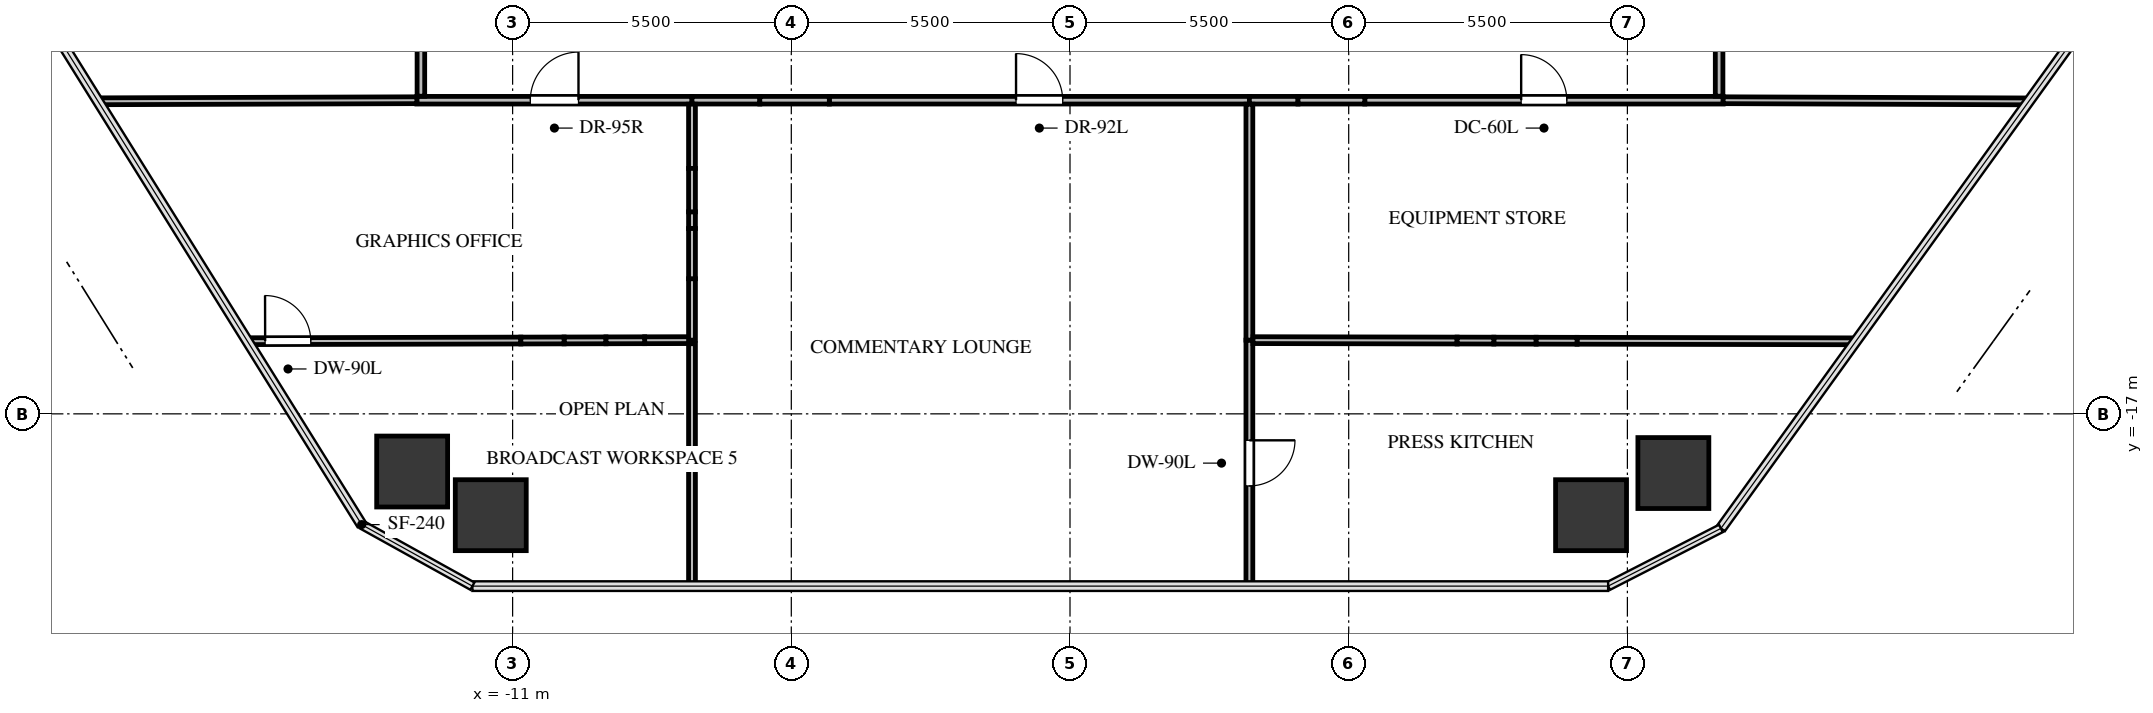
"""IFC4 building model, lengths in metres.
Left out: names, types, materials, properties, quantities, classifications, styles, units other than length and angle.
Written with IfcOpenShell. Run it as: python <this file> out.ifc"""

import sys

from ifc_helpers import new_model, si_unit, direction, frame, frame_2d, origin, origin_2d, place, context, subcontext, project, spatial, rectangle, extrude, source, transform, mapped, element, fill, save


model = new_model("IFC4")
c1 = context("Model", 3, precision=1e-05, world=origin(), true_north=direction((0.0, 1.0)))
c2 = subcontext(c1, "Body", "Model", "MODEL_VIEW")
j1 = project(units=[si_unit("LENGTHUNIT", "METRE"), si_unit("PLANEANGLEUNIT", "RADIAN")], contexts=[c1])
p1 = place(None, origin())
s1 = spatial("IfcSite", under=j1, at=p1, CompositionType="ELEMENT")
p2 = place(p1, origin())
s2 = spatial("IfcBuilding", under=s1, at=p2, CompositionType="ELEMENT")
p3 = place(p2, frame((0.0, 0.0, 48.9)))
s3 = spatial("IfcBuildingStorey", under=s2, at=p3, CompositionType="ELEMENT", Elevation=48.9)
m1 = source(origin(), c2, "Body", "SweptSolid", [
    extrude(rectangle(XDim=1.4, YDim=1.4, at=origin_2d()), origin(), (0.0, 0.0, 1.0), 3.3),
])
for number, where, z_axis, x_axis in (
    (1, (-12.983, -18.138, -0.24), (0.0, 0.0, 1.0), (1.0, 0.0, 0.0)),
    (2, (11.907, -18.168, -0.24), (0.0, 0.0, 1.0), (1.0, 0.0, 0.0)),
    (3, (10.283, -19.0, -0.24), (0.0, 0.0, 1.0), (1.0, 0.0, 0.0)),
    (4, (-11.431, -19.0, -0.24), (0.0, 0.0, 1.0), (1.0, 0.0, 0.0)),
):
    element("IfcColumn", number, at=place(p3, frame(where, z_axis=z_axis, x_axis=x_axis)), inside=s3, PredefinedType="COLUMN", context=c2, shape_type="MappedRepresentation", body=[
        mapped(m1, transform((0.0, 0.0, 0.0), x_axis=(1.0, 0.0, 0.0), y_axis=(0.0, 1.0, 0.0), z_axis=(0.0, 0.0, 1.0), scale=1.0)),
    ])
p4 = place(p3, frame((-12.89, -10.81, 0.0), z_axis=(0.0, 0.0, 1.0), x_axis=(1.0, 0.0, 0.0)))
e5 = element("IfcWall", 5, at=p4, inside=s3, PredefinedType="PARTITIONING", context=c2, shape_type="SweptSolid", body=[
    extrude(rectangle(XDim=5.43, YDim=0.15, at=frame_2d((2.715, 0.0))), origin(), (0.0, 0.0, 1.0), 3.045),
])
p5 = place(p4, frame((2.24, 0.0, 0.0)))
e6 = element("IfcOpeningElement", 6, at=p5, cuts=e5, PredefinedType="OPENING", context=c2, shape_type="SweptSolid", body=[
    extrude(rectangle(XDim=0.95, YDim=2.1, at=frame_2d((0.475, 1.05))), frame((0.0, 0.085, 0.0), z_axis=(0.0, -1.0, 0.0), x_axis=(1.0, 0.0, 0.0)), (0.0, 0.0, 1.0), 0.17),
])
p6 = place(p3, frame((-7.46, -10.81, 0.0), z_axis=(0.0, 0.0, 1.0), x_axis=(1.0, 0.0, 0.0)))
e7 = element("IfcWall", 7, at=p6, inside=s3, PredefinedType="PARTITIONING", context=c2, shape_type="SweptSolid", body=[
    extrude(rectangle(XDim=1.338, YDim=0.15, at=frame_2d((0.669, 0.0))), origin(), (0.0, 0.0, 1.0), 2.13),
])
p7 = place(p3, frame((-4.75, -10.81, 0.0), z_axis=(0.0, 0.0, 1.0), x_axis=(1.0, 0.0, 0.0)))
e8 = element("IfcWall", 8, at=p7, inside=s3, PredefinedType="PARTITIONING", context=c2, shape_type="SweptSolid", body=[
    extrude(rectangle(XDim=8.29, YDim=0.15, at=frame_2d((4.145, 0.0))), origin(), (0.0, 0.0, 1.0), 3.045),
])
p8 = place(p7, frame((3.685, 0.0, 0.0)))
e9 = element("IfcOpeningElement", 9, at=p8, cuts=e8, PredefinedType="OPENING", context=c2, shape_type="SweptSolid", body=[
    extrude(rectangle(XDim=0.92, YDim=2.1, at=frame_2d((0.46, 1.05))), frame((0.0, 0.085, 0.0), z_axis=(0.0, -1.0, 0.0), x_axis=(1.0, 0.0, 0.0)), (0.0, 0.0, 1.0), 0.17),
])
p9 = place(p3, frame((-6.122, -10.81, 0.0), z_axis=(0.0, 0.0, 1.0), x_axis=(1.0, 0.0, 0.0)))
e10 = element("IfcWall", 10, at=p9, inside=s3, PredefinedType="PARTITIONING", context=c2, shape_type="SweptSolid", body=[
    extrude(rectangle(XDim=1.372, YDim=0.15, at=frame_2d((0.686, 0.0))), origin(), (0.0, 0.0, 1.0), 2.13),
])
p10 = place(p3, frame((3.54, -10.81, 0.0), z_axis=(0.0, 0.0, 1.0), x_axis=(1.0, 0.0, 0.0)))
e11 = element("IfcWall", 11, at=p10, inside=s3, PredefinedType="PARTITIONING", context=c2, shape_type="SweptSolid", body=[
    extrude(rectangle(XDim=0.959, YDim=0.15, at=frame_2d((0.479, 0.0))), origin(), (0.0, 0.0, 1.0), 3.045),
])
p11 = place(p3, frame((5.817, -10.81, 0.0), z_axis=(0.0, 0.0, 1.0), x_axis=(1.0, 0.0, 0.0)))
e12 = element("IfcWall", 12, at=p11, inside=s3, PredefinedType="PARTITIONING", context=c2, shape_type="SweptSolid", body=[
    extrude(rectangle(XDim=7.073, YDim=0.15, at=frame_2d((3.536, 0.0))), origin(), (0.0, 0.0, 1.0), 2.13),
])
p12 = place(p11, frame((3.086, 0.0, 0.0)))
e13 = element("IfcOpeningElement", 13, at=p12, cuts=e12, PredefinedType="OPENING", context=c2, shape_type="SweptSolid", body=[
    extrude(rectangle(XDim=0.9, YDim=2.05, at=frame_2d((0.45, 1.025))), frame((0.0, 0.085, 0.0), z_axis=(0.0, -1.0, 0.0), x_axis=(1.0, 0.0, 0.0)), (0.0, 0.0, 1.0), 0.17),
])
p13 = place(p3, frame((4.499, -10.81, 0.0), z_axis=(0.0, 0.0, 1.0), x_axis=(1.0, 0.0, 0.0)))
e14 = element("IfcWall", 14, at=p13, inside=s3, PredefinedType="PARTITIONING", context=c2, shape_type="SweptSolid", body=[
    extrude(rectangle(XDim=1.318, YDim=0.15, at=frame_2d((0.659, 0.0))), origin(), (0.0, 0.0, 1.0), 2.13),
])
p14 = place(p3, frame((-12.81, 1.54, 0.0), z_axis=(0.0, 0.0, 1.0), x_axis=(0.0, -1.0, 0.0)))
e15 = element("IfcWall", 15, at=p14, inside=s3, PredefinedType="PARTITIONING", context=c2, shape_type="SweptSolid", body=[
    extrude(rectangle(XDim=12.271, YDim=0.15, at=frame_2d((6.135, 0.0))), origin(), (0.0, 0.0, 1.0), 3.045),
])
p15 = place(p14, frame((5.335, 0.0, 0.0)))
e16 = element("IfcOpeningElement", 16, at=p15, cuts=e15, PredefinedType="OPENING", context=c2, shape_type="SweptSolid", body=[
    extrude(rectangle(XDim=1.6, YDim=2.15, at=frame_2d((0.8, 1.075))), frame((0.0, 0.085, 0.0), z_axis=(0.0, -1.0, 0.0), x_axis=(1.0, 0.0, 0.0)), (0.0, 0.0, 1.0), 0.17),
])
p16 = place(p3, frame((12.81, -10.731, 0.0), z_axis=(0.0, 0.0, 1.0), x_axis=(0.0, 1.0, 0.0)))
e17 = element("IfcWall", 17, at=p16, inside=s3, PredefinedType="PARTITIONING", context=c2, shape_type="SweptSolid", body=[
    extrude(rectangle(XDim=2.291, YDim=0.15, at=frame_2d((1.146, 0.0))), origin(), (0.0, 0.0, 1.0), 3.045),
])
p17 = place(p3, frame((-16.234, -15.566, 0.0), z_axis=(0.0, 0.0, 1.0), x_axis=(0.999997015087, 0.002443321063, 0.0)))
e18 = element("IfcWall", 18, at=p17, inside=s3, PredefinedType="PARTITIONING", context=c2, shape_type="SweptSolid", body=[
    extrude(rectangle(XDim=5.396, YDim=0.135, at=frame_2d((2.698, 0.0))), origin(), (0.0, 0.0, 1.0), 2.13),
])
p18 = place(p17, frame((0.35, 0.0, 0.0)))
e19 = element("IfcOpeningElement", 19, at=p18, cuts=e18, PredefinedType="OPENING", context=c2, shape_type="SweptSolid", body=[
    extrude(rectangle(XDim=0.9, YDim=2.05, at=frame_2d((0.45, 1.025))), frame((0.0, 0.078, 0.0), z_axis=(0.0, -1.0, 0.0), x_axis=(1.0, 0.0, 0.0)), (0.0, 0.0, 1.0), 0.155),
])
p19 = place(p3, frame((-9.984, -15.551, 0.0), z_axis=(0.0, 0.0, 1.0), x_axis=(0.999997208907, 0.002362663222, 0.0)))
e20 = element("IfcWall", 20, at=p19, inside=s3, PredefinedType="PARTITIONING", context=c2, shape_type="SweptSolid", body=[
    extrude(rectangle(XDim=0.827, YDim=0.135, at=frame_2d((0.413, 0.0))), origin(), (0.0, 0.0, 1.0), 2.13),
])
p20 = place(p3, frame((-8.394, -15.547, 0.0), z_axis=(0.0, 0.0, 1.0), x_axis=(0.999997233292, 0.002352319681, 0.0)))
e21 = element("IfcWall", 21, at=p20, inside=s3, PredefinedType="PARTITIONING", context=c2, shape_type="SweptSolid", body=[
    extrude(rectangle(XDim=0.934, YDim=0.135, at=frame_2d((0.467, 0.0))), origin(), (0.0, 0.0, 1.0), 3.045),
])
p21 = place(p3, frame((-10.838, -15.553, 0.0), z_axis=(0.0, 0.0, 1.0), x_axis=(0.999997383281, 0.002287669164, 0.0)))
e22 = element("IfcWall", 22, at=p21, inside=s3, PredefinedType="PARTITIONING", context=c2, shape_type="SweptSolid", body=[
    extrude(rectangle(XDim=0.854, YDim=0.135, at=frame_2d((0.427, 0.0))), origin(), (0.0, 0.0, 1.0), 2.13),
])
p22 = place(p3, frame((-9.157, -15.549, 0.0), z_axis=(0.0, 0.0, 1.0), x_axis=(0.999996727406, 0.002558354275, 0.0)))
e23 = element("IfcWall", 23, at=p22, inside=s3, PredefinedType="PARTITIONING", context=c2, shape_type="SweptSolid", body=[
    extrude(rectangle(XDim=0.763, YDim=0.135, at=frame_2d((0.382, 0.0))), origin(), (0.0, 0.0, 1.0), 2.13),
])
p23 = place(p3, frame((-7.46, -15.616, 0.0), z_axis=(0.0, 0.0, 1.0), x_axis=(0.0, -1.0, 0.0)))
e24 = element("IfcWall", 24, at=p23, inside=s3, PredefinedType="PARTITIONING", context=c2, shape_type="SweptSolid", body=[
    extrude(rectangle(XDim=4.783, YDim=0.135, at=frame_2d((2.392, 0.0))), origin(), (0.0, 0.0, 1.0), 2.38),
])
p24 = place(p3, frame((-7.46, -10.889, 0.0), z_axis=(0.0, 0.0, 1.0), x_axis=(0.0, -1.0, 0.0)))
e25 = element("IfcWall", 25, at=p24, inside=s3, PredefinedType="PARTITIONING", context=c2, shape_type="SweptSolid", body=[
    extrude(rectangle(XDim=1.267, YDim=0.135, at=frame_2d((0.634, 0.0))), origin(), (0.0, 0.0, 1.0), 2.13),
])
p25 = place(p3, frame((-7.46, -13.013, 0.0), z_axis=(0.0, 0.0, 1.0), x_axis=(0.0, -1.0, 0.0)))
e26 = element("IfcWall", 26, at=p25, inside=s3, PredefinedType="PARTITIONING", context=c2, shape_type="SweptSolid", body=[
    extrude(rectangle(XDim=0.33, YDim=0.135, at=frame_2d((0.165, 0.0))), origin(), (0.0, 0.0, 1.0), 2.13),
])
p26 = place(p3, frame((-7.46, -14.333, 0.0), z_axis=(0.0, 0.0, 1.0), x_axis=(0.0, -1.0, 0.0)))
e27 = element("IfcWall", 27, at=p26, inside=s3, PredefinedType="PARTITIONING", context=c2, shape_type="SweptSolid", body=[
    extrude(rectangle(XDim=1.212, YDim=0.135, at=frame_2d((0.606, 0.0))), origin(), (0.0, 0.0, 1.0), 2.13),
])
p27 = place(p3, frame((-7.46, -12.156, 0.0), z_axis=(0.0, 0.0, 1.0), x_axis=(0.0, -1.0, 0.0)))
e28 = element("IfcWall", 28, at=p27, inside=s3, PredefinedType="PARTITIONING", context=c2, shape_type="SweptSolid", body=[
    extrude(rectangle(XDim=0.857, YDim=0.135, at=frame_2d((0.428, 0.0))), origin(), (0.0, 0.0, 1.0), 2.13),
])
p28 = place(p3, frame((-7.46, -13.342, 0.0), z_axis=(0.0, 0.0, 1.0), x_axis=(0.0, -1.0, 0.0)))
e29 = element("IfcWall", 29, at=p28, inside=s3, PredefinedType="PARTITIONING", context=c2, shape_type="SweptSolid", body=[
    extrude(rectangle(XDim=0.991, YDim=0.135, at=frame_2d((0.495, 0.0))), origin(), (0.0, 0.0, 1.0), 2.13),
])
p29 = place(p3, frame((-19.182, -10.831, 0.0), z_axis=(0.0, 0.0, 1.0), x_axis=(0.999994432845, 0.003336806783, 0.0)))
e30 = element("IfcWall", 30, at=p29, inside=s3, PredefinedType="PARTITIONING", context=c2, shape_type="SweptSolid", body=[
    extrude(rectangle(XDim=6.292, YDim=0.135, at=frame_2d((3.146, 0.0))), origin(), (0.0, 0.0, 1.0), 2.38),
])
p30 = place(p3, frame((3.54, -15.545, 0.0), z_axis=(0.0, 0.0, 1.0), x_axis=(0.0, -1.0, 0.0)))
e31 = element("IfcWall", 31, at=p30, inside=s3, PredefinedType="PARTITIONING", context=c2, shape_type="SweptSolid", body=[
    extrude(rectangle(XDim=4.855, YDim=0.135, at=frame_2d((2.427, 0.0))), origin(), (0.0, 0.0, 1.0), 2.38),
])
p31 = place(p30, frame((1.978, 0.0, 0.0)))
e32 = element("IfcOpeningElement", 32, at=p31, cuts=e31, PredefinedType="OPENING", context=c2, shape_type="SweptSolid", body=[
    extrude(rectangle(XDim=0.9, YDim=2.05, at=frame_2d((0.45, 1.025))), frame((0.0, 0.078, 0.0), z_axis=(0.0, -1.0, 0.0), x_axis=(1.0, 0.0, 0.0)), (0.0, 0.0, 1.0), 0.155),
])
p32 = place(p3, frame((3.54, -10.889, 0.0), z_axis=(0.0, 0.0, 1.0), x_axis=(0.0, -1.0, 0.0)))
e33 = element("IfcWall", 33, at=p32, inside=s3, PredefinedType="PARTITIONING", context=c2, shape_type="SweptSolid", body=[
    extrude(rectangle(XDim=4.656, YDim=0.135, at=frame_2d((2.328, 0.0))), origin(), (0.0, 0.0, 1.0), 3.045),
])
p33 = place(p3, frame((3.612, -15.545, 0.0), z_axis=(0.0, 0.0, 1.0), x_axis=(0.999998234227, -0.001879240135, 0.0)))
e34 = element("IfcWall", 34, at=p33, inside=s3, PredefinedType="PARTITIONING", context=c2, shape_type="SweptSolid", body=[
    extrude(rectangle(XDim=4.027, YDim=0.135, at=frame_2d((2.014, 0.0))), origin(), (0.0, 0.0, 1.0), 3.045),
])
p34 = place(p3, frame((8.364, -15.554, 0.0), z_axis=(0.0, 0.0, 1.0), x_axis=(0.999997907793, -0.002045583096, 0.0)))
e35 = element("IfcWall", 35, at=p34, inside=s3, PredefinedType="PARTITIONING", context=c2, shape_type="SweptSolid", body=[
    extrude(rectangle(XDim=0.835, YDim=0.135, at=frame_2d((0.418, 0.0))), origin(), (0.0, 0.0, 1.0), 3.045),
])
p35 = place(p3, frame((10.007, -15.558, 0.0), z_axis=(0.0, 0.0, 1.0), x_axis=(0.999998093672, -0.00195260123, 0.0)))
e36 = element("IfcWall", 36, at=p35, inside=s3, PredefinedType="PARTITIONING", context=c2, shape_type="SweptSolid", body=[
    extrude(rectangle(XDim=5.501, YDim=0.135, at=frame_2d((2.751, 0.0))), origin(), (0.0, 0.0, 1.0), 2.38),
])
p36 = place(p3, frame((7.639, -15.553, 0.0), z_axis=(0.0, 0.0, 1.0), x_axis=(0.999997960772, -0.002019517928, 0.0)))
e37 = element("IfcWall", 37, at=p36, inside=s3, PredefinedType="PARTITIONING", context=c2, shape_type="SweptSolid", body=[
    extrude(rectangle(XDim=0.725, YDim=0.135, at=frame_2d((0.363, 0.0))), origin(), (0.0, 0.0, 1.0), 2.13),
])
p37 = place(p3, frame((9.2, -15.556, 0.0), z_axis=(0.0, 0.0, 1.0), x_axis=(0.999998352109, -0.001815428173, 0.0)))
e38 = element("IfcWall", 38, at=p37, inside=s3, PredefinedType="PARTITIONING", context=c2, shape_type="SweptSolid", body=[
    extrude(rectangle(XDim=0.807, YDim=0.135, at=frame_2d((0.403, 0.0))), origin(), (0.0, 0.0, 1.0), 2.13),
])
p38 = place(p3, frame((12.89, -10.81, 0.0), z_axis=(0.0, 0.0, 1.0), x_axis=(0.999992607823, -0.003845035728, 0.0)))
e39 = element("IfcWall", 39, at=p38, inside=s3, PredefinedType="PARTITIONING", context=c2, shape_type="SweptSolid", body=[
    extrude(rectangle(XDim=6.032, YDim=0.135, at=frame_2d((3.016, 0.0))), origin(), (0.0, 0.0, 1.0), 2.38),
])
m2 = source(origin(), c2, "Body", "SweptSolid", [
    extrude(rectangle(XDim=0.95, YDim=2.1, at=frame_2d((0.475, 1.05))), frame((0.0, 0.025, 0.0), z_axis=(0.0, -1.0, 0.0), x_axis=(1.0, 0.0, 0.0)), (0.0, 0.0, 1.0), 0.05),
])
p39 = place(p5, origin())
e40 = element("IfcDoor", 40, at=p39, inside=s3, OperationType="SINGLE_SWING_RIGHT", PredefinedType="DOOR", context=c2, shape_type="MappedRepresentation", body=[
    mapped(m2, transform((0.0, 0.0, 0.0), x_axis=(1.0, 0.0, 0.0), y_axis=(0.0, 1.0, 0.0), z_axis=(0.0, 0.0, 1.0), scale=1.0)),
])
fill(e6, e40)
m3 = source(origin(), c2, "Body", "SweptSolid", [
    extrude(rectangle(XDim=0.92, YDim=2.1, at=frame_2d((0.46, 1.05))), frame((0.0, 0.025, 0.0), z_axis=(0.0, -1.0, 0.0), x_axis=(1.0, 0.0, 0.0)), (0.0, 0.0, 1.0), 0.05),
])
p40 = place(p8, origin())
e41 = element("IfcDoor", 41, at=p40, inside=s3, OperationType="SINGLE_SWING_LEFT", PredefinedType="DOOR", context=c2, shape_type="MappedRepresentation", body=[
    mapped(m3, transform((0.0, 0.0, 0.0), x_axis=(1.0, 0.0, 0.0), y_axis=(0.0, 1.0, 0.0), z_axis=(0.0, 0.0, 1.0), scale=1.0)),
])
fill(e9, e41)
m4 = source(origin(), c2, "Body", "SweptSolid", [
    extrude(rectangle(XDim=0.9, YDim=2.05, at=frame_2d((0.45, 1.025))), frame((0.0, 0.025, 0.0), z_axis=(0.0, -1.0, 0.0), x_axis=(1.0, 0.0, 0.0)), (0.0, 0.0, 1.0), 0.05),
])
p41 = place(p12, origin())
e42 = element("IfcDoor", 42, at=p41, inside=s3, OperationType="SINGLE_SWING_LEFT", PredefinedType="DOOR", context=c2, shape_type="MappedRepresentation", body=[
    mapped(m4, transform((0.0, 0.0, 0.0), x_axis=(1.0, 0.0, 0.0), y_axis=(0.0, 1.0, 0.0), z_axis=(0.0, 0.0, 1.0), scale=1.0)),
])
fill(e13, e42)
m5 = source(origin(), c2, "Body", "SweptSolid", [
    extrude(rectangle(XDim=0.9, YDim=2.05, at=frame_2d((0.45, 1.025))), frame((0.0, 0.025, 0.0), z_axis=(0.0, -1.0, 0.0), x_axis=(1.0, 0.0, 0.0)), (0.0, 0.0, 1.0), 0.05),
])
p42 = place(p18, origin())
e43 = element("IfcDoor", 43, at=p42, inside=s3, OperationType="SINGLE_SWING_LEFT", PredefinedType="DOOR", context=c2, shape_type="MappedRepresentation", body=[
    mapped(m5, transform((0.0, 0.0, 0.0), x_axis=(1.0, 0.0, 0.0), y_axis=(0.0, 1.0, 0.0), z_axis=(0.0, 0.0, 1.0), scale=1.0)),
])
fill(e19, e43)
p43 = place(p31, origin())
e44 = element("IfcDoor", 44, at=p43, inside=s3, OperationType="SINGLE_SWING_LEFT", PredefinedType="DOOR", context=c2, shape_type="MappedRepresentation", body=[
    mapped(m5, transform((0.0, 0.0, 0.0), x_axis=(1.0, 0.0, 0.0), y_axis=(0.0, 1.0, 0.0), z_axis=(0.0, 0.0, 1.0), scale=1.0)),
])
fill(e32, e44)
save(model, sys.argv[1])
